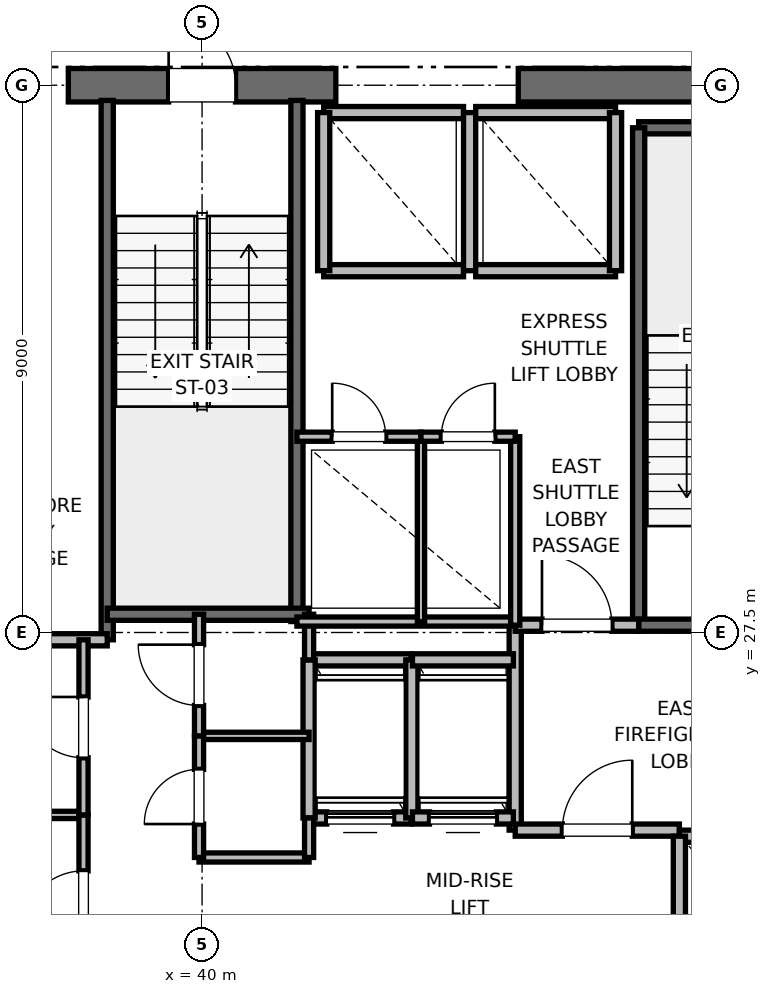
"""IFC4 building model, lengths in metres.
Left out: names, types, materials, properties, quantities, classifications, styles, units other than length and angle.
Written with IfcOpenShell. Run it as: python <this file> out.ifc"""

import sys

from ifc_helpers import new_model, si_unit, direction, frame, frame_2d, origin, place, context, subcontext, project, spatial, rectangle, extrude, element, fill, save


model = new_model("IFC4")
c1 = context("Model", 3, precision=1e-05, world=origin(), true_north=direction((0.0, 1.0)))
c2 = subcontext(c1, "Body", "Model", "MODEL_VIEW")
j1 = project(units=[si_unit("LENGTHUNIT", "METRE"), si_unit("PLANEANGLEUNIT", "RADIAN")], contexts=[c1])
p1 = place(None, origin())
s1 = spatial("IfcSite", under=j1, at=p1, CompositionType="ELEMENT")
p2 = place(p1, origin())
s2 = spatial("IfcBuilding", under=s1, at=p2, CompositionType="ELEMENT")
p3 = place(p2, frame((0.0, 0.0, 148.4)))
s3 = spatial("IfcBuildingStorey", under=s2, at=p3, CompositionType="ELEMENT", Elevation=148.4)
p4 = place(p3, frame((37.8, 36.5, 0.0), z_axis=(0.0, 0.0, 1.0), x_axis=(1.0, 0.0, 0.0)))
e1 = element("IfcWall", 1, at=p4, inside=s3, PredefinedType="SHEAR", context=c2, shape_type="SweptSolid", body=[
    extrude(rectangle(XDim=4.4, YDim=0.55, at=frame_2d((2.2, 0.0))), origin(), (0.0, 0.0, 1.0), 3.775),
])
p5 = place(p4, frame((1.65, 0.0, 0.0)))
e2 = element("IfcOpeningElement", 2, at=p5, cuts=e1, PredefinedType="OPENING", context=c2, shape_type="SweptSolid", body=[
    extrude(rectangle(XDim=1.1, YDim=2.15, at=frame_2d((0.55, 1.075))), frame((0.0, 0.275, 0.0), z_axis=(0.0, -1.0, 0.0), x_axis=(1.0, 0.0, 0.0)), (0.0, 0.0, 1.0), 0.55),
])
p6 = place(p3, frame((45.2, 36.5, 0.0), z_axis=(0.0, 0.0, 1.0), x_axis=(1.0, 0.0, 0.0)))
e3 = element("IfcWall", 3, at=p6, inside=s3, PredefinedType="SHEAR", context=c2, shape_type="SweptSolid", body=[
    extrude(rectangle(XDim=5.8, YDim=0.55, at=frame_2d((2.9, 0.0))), origin(), (0.0, 0.0, 1.0), 3.775),
])
p7 = place(p3, frame((47.18, 35.8, 0.0), z_axis=(0.0, 0.0, 1.0), x_axis=(1.0, 0.0, 0.0)))
e4 = element("IfcWall", 4, at=p7, inside=s3, PredefinedType="SOLIDWALL", context=c2, shape_type="SweptSolid", body=[
    extrude(rectangle(XDim=3.12, YDim=0.2, at=frame_2d((1.56, 0.0))), origin(), (0.0, 0.0, 1.0), 3.775),
])
p8 = place(p3, frame((47.18, 27.62, 0.0), z_axis=(0.0, 0.0, 1.0), x_axis=(0.0, 1.0, 0.0)))
e5 = element("IfcWall", 5, at=p8, inside=s3, PredefinedType="SOLIDWALL", context=c2, shape_type="SweptSolid", body=[
    extrude(rectangle(XDim=8.18, YDim=0.2, at=frame_2d((4.09, 0.0))), origin(), (0.0, 0.0, 1.0), 3.775),
])
p9 = place(p3, frame((47.18, 27.62, 0.0), z_axis=(0.0, 0.0, 1.0), x_axis=(1.0, 0.0, 0.0)))
e6 = element("IfcWall", 6, at=p9, inside=s3, PredefinedType="SOLIDWALL", context=c2, shape_type="SweptSolid", body=[
    extrude(rectangle(XDim=3.12, YDim=0.2, at=frame_2d((1.56, 0.0))), origin(), (0.0, 0.0, 1.0), 3.775),
])
p10 = place(p9, frame((1.01, 0.0, 0.0)))
e7 = element("IfcOpeningElement", 7, at=p10, cuts=e6, PredefinedType="OPENING", context=c2, shape_type="SweptSolid", body=[
    extrude(rectangle(XDim=1.1, YDim=2.15, at=frame_2d((0.55, 1.075))), frame((0.0, 0.1, 0.0), z_axis=(0.0, -1.0, 0.0), x_axis=(1.0, 0.0, 0.0)), (0.0, 0.0, 1.0), 0.2),
])
p11 = place(p3, frame((38.44, 27.38, 0.0), z_axis=(0.0, 0.0, 1.0), x_axis=(0.0, 1.0, 0.0)))
e8 = element("IfcWall", 8, at=p11, inside=s3, PredefinedType="SOLIDWALL", context=c2, shape_type="SweptSolid", body=[
    extrude(rectangle(XDim=8.87, YDim=0.2, at=frame_2d((4.435, 0.0))), origin(), (0.0, 0.0, 1.0), 3.775),
])
p12 = place(p3, frame((41.56, 27.68, 0.0), z_axis=(0.0, 0.0, 1.0), x_axis=(0.0, 1.0, 0.0)))
e9 = element("IfcWall", 9, at=p12, inside=s3, PredefinedType="SOLIDWALL", context=c2, shape_type="SweptSolid", body=[
    extrude(rectangle(XDim=8.57, YDim=0.2, at=frame_2d((4.285, 0.0))), origin(), (0.0, 0.0, 1.0), 3.775),
])
p13 = place(p3, frame((38.44, 27.8, 0.0), z_axis=(0.0, 0.0, 1.0), x_axis=(1.0, 0.0, 0.0)))
e10 = element("IfcWall", 10, at=p13, inside=s3, PredefinedType="SOLIDWALL", context=c2, shape_type="SweptSolid", body=[
    extrude(rectangle(XDim=3.32, YDim=0.2, at=frame_2d((1.66, 0.0))), origin(), (0.0, 0.0, 1.0), 3.775),
])
p14 = place(p3, frame((32.82, 27.38, 0.0), z_axis=(0.0, 0.0, 1.0), x_axis=(1.0, 0.0, 0.0)))
e11 = element("IfcWall", 11, at=p14, inside=s3, PredefinedType="PARTITIONING", context=c2, shape_type="SweptSolid", body=[
    extrude(rectangle(XDim=5.62, YDim=0.2, at=frame_2d((2.81, 0.0))), origin(), (0.0, 0.0, 1.0), 3.775),
])
p15 = place(p3, frame((45.15, 24.25, 0.0), z_axis=(0.0, 0.0, 1.0), x_axis=(0.0, 1.0, 0.0)))
e12 = element("IfcWall", 12, at=p15, inside=s3, PredefinedType="PARTITIONING", context=c2, shape_type="SweptSolid", body=[
    extrude(rectangle(XDim=3.37, YDim=0.2, at=frame_2d((1.685, 0.0))), origin(), (0.0, 0.0, 1.0), 3.775),
])
p16 = place(p3, frame((45.15, 24.25, 0.0), z_axis=(0.0, 0.0, 1.0), x_axis=(1.0, 0.0, 0.0)))
e13 = element("IfcWall", 13, at=p16, inside=s3, PredefinedType="PARTITIONING", context=c2, shape_type="SweptSolid", body=[
    extrude(rectangle(XDim=2.7, YDim=0.2, at=frame_2d((1.35, 0.0))), origin(), (0.0, 0.0, 1.0), 3.775),
])
p17 = place(p16, frame((0.775, 0.0, 0.0)))
e14 = element("IfcOpeningElement", 14, at=p17, cuts=e13, PredefinedType="OPENING", context=c2, shape_type="SweptSolid", body=[
    extrude(rectangle(XDim=1.15, YDim=2.2, at=frame_2d((0.575, 1.1))), frame((0.0, 0.1, 0.0), z_axis=(0.0, -1.0, 0.0), x_axis=(1.0, 0.0, 0.0)), (0.0, 0.0, 1.0), 0.2),
])
p18 = place(p3, frame((45.15, 27.62, 0.0), z_axis=(0.0, 0.0, 1.0), x_axis=(1.0, 0.0, 0.0)))
e15 = element("IfcWall", 15, at=p18, inside=s3, PredefinedType="PARTITIONING", context=c2, shape_type="SweptSolid", body=[
    extrude(rectangle(XDim=2.03, YDim=0.2, at=frame_2d((1.015, 0.0))), origin(), (0.0, 0.0, 1.0), 3.775),
])
p19 = place(p18, frame((0.44, 0.0, 0.0)))
e16 = element("IfcOpeningElement", 16, at=p19, cuts=e15, PredefinedType="OPENING", context=c2, shape_type="SweptSolid", body=[
    extrude(rectangle(XDim=1.15, YDim=2.2, at=frame_2d((0.575, 1.1))), frame((0.0, 0.1, 0.0), z_axis=(0.0, -1.0, 0.0), x_axis=(1.0, 0.0, 0.0)), (0.0, 0.0, 1.0), 0.2),
])
p20 = place(p3, frame((50.45, 24.15, 0.0), z_axis=(0.0, 0.0, 1.0), x_axis=(-1.0, 0.0, 0.0)))
e17 = element("IfcWall", 17, at=p20, inside=s3, PredefinedType="SOLIDWALL", context=c2, shape_type="SweptSolid", body=[
    extrude(rectangle(XDim=2.6, YDim=0.2, at=frame_2d((1.3, 0.0))), origin(), (0.0, 0.0, 1.0), 2.755),
])
p21 = place(p20, frame((0.75, 0.0, 0.0)))
e18 = element("IfcOpeningElement", 18, at=p21, cuts=e17, PredefinedType="OPENING", context=c2, shape_type="SweptSolid", body=[
    extrude(rectangle(XDim=1.1, YDim=2.2, at=frame_2d((0.55, 1.1))), frame((0.0, 0.1, 0.0), z_axis=(0.0, -1.0, 0.0), x_axis=(1.0, 0.0, 0.0)), (0.0, 0.0, 1.0), 0.2),
])
p22 = place(p3, frame((47.85, 24.15, 0.0), z_axis=(0.0, 0.0, 1.0), x_axis=(0.0, -1.0, 0.0)))
e19 = element("IfcWall", 19, at=p22, inside=s3, PredefinedType="SOLIDWALL", context=c2, shape_type="SweptSolid", body=[
    extrude(rectangle(XDim=3.0, YDim=0.2, at=frame_2d((1.5, 0.0))), origin(), (0.0, 0.0, 1.0), 3.775),
])
p23 = place(p3, frame((41.76, 24.45, 0.0), z_axis=(0.0, 0.0, 1.0), x_axis=(1.0, 0.0, 0.0)))
e20 = element("IfcWall", 20, at=p23, inside=s3, PredefinedType="SOLIDWALL", context=c2, shape_type="SweptSolid", body=[
    extrude(rectangle(XDim=1.68, YDim=0.2, at=frame_2d((0.84, 0.0))), origin(), (0.0, 0.0, 1.0), 3.775),
])
p24 = place(p23, frame((0.29, 0.0, 0.0)))
e21 = element("IfcOpeningElement", 21, at=p24, cuts=e20, PredefinedType="OPENING", context=c2, shape_type="SweptSolid", body=[
    extrude(rectangle(XDim=1.1, YDim=2.2, at=frame_2d((0.55, 1.1))), frame((0.0, 0.1, 0.0), z_axis=(0.0, -1.0, 0.0), x_axis=(1.0, 0.0, 0.0)), (0.0, 0.0, 1.0), 0.2),
])
p25 = place(p3, frame((43.44, 27.05, 0.0), z_axis=(0.0, 0.0, 1.0), x_axis=(-1.0, 0.0, 0.0)))
e22 = element("IfcWall", 22, at=p25, inside=s3, PredefinedType="SOLIDWALL", context=c2, shape_type="SweptSolid", body=[
    extrude(rectangle(XDim=1.68, YDim=0.2, at=frame_2d((0.84, 0.0))), origin(), (0.0, 0.0, 1.0), 3.775),
])
for number, where, z_axis, x_axis in (
    (23, (41.76, 27.05, 0.0), (0.0, 0.0, 1.0), (0.0, -1.0, 0.0)),
    (24, (43.45, 24.45, 0.0), (0.0, 0.0, 1.0), (0.0, 1.0, 0.0)),
):
    element("IfcWall", number, at=place(p3, frame(where, z_axis=z_axis, x_axis=x_axis)), inside=s3, PredefinedType="SOLIDWALL", context=c2, shape_type="SweptSolid", body=[
        extrude(rectangle(XDim=2.6, YDim=0.2, at=frame_2d((1.3, 0.0))), origin(), (0.0, 0.0, 1.0), 3.775),
    ])
p26 = place(p3, frame((43.46, 24.45, 0.0), z_axis=(0.0, 0.0, 1.0), x_axis=(1.0, 0.0, 0.0)))
e25 = element("IfcWall", 25, at=p26, inside=s3, PredefinedType="SOLIDWALL", context=c2, shape_type="SweptSolid", body=[
    extrude(rectangle(XDim=1.66, YDim=0.2, at=frame_2d((0.83, 0.0))), origin(), (0.0, 0.0, 1.0), 3.775),
])
p27 = place(p26, frame((0.28, 0.0, 0.0)))
e26 = element("IfcOpeningElement", 26, at=p27, cuts=e25, PredefinedType="OPENING", context=c2, shape_type="SweptSolid", body=[
    extrude(rectangle(XDim=1.1, YDim=2.2, at=frame_2d((0.55, 1.1))), frame((0.0, 0.1, 0.0), z_axis=(0.0, -1.0, 0.0), x_axis=(1.0, 0.0, 0.0)), (0.0, 0.0, 1.0), 0.2),
])
p28 = place(p3, frame((45.12, 27.05, 0.0), z_axis=(0.0, 0.0, 1.0), x_axis=(-1.0, 0.0, 0.0)))
e27 = element("IfcWall", 27, at=p28, inside=s3, PredefinedType="SOLIDWALL", context=c2, shape_type="SweptSolid", body=[
    extrude(rectangle(XDim=1.66, YDim=0.2, at=frame_2d((0.83, 0.0))), origin(), (0.0, 0.0, 1.0), 3.775),
])
p29 = place(p3, frame((42.0, 33.45, 0.0), z_axis=(0.0, 0.0, 1.0), x_axis=(1.0, 0.0, 0.0)))
e28 = element("IfcWall", 28, at=p29, inside=s3, PredefinedType="SOLIDWALL", context=c2, shape_type="SweptSolid", body=[
    extrude(rectangle(XDim=2.3, YDim=0.2, at=frame_2d((1.15, 0.0))), origin(), (0.0, 0.0, 1.0), 3.775),
])
p30 = place(p3, frame((44.3, 36.05, 0.0), z_axis=(0.0, 0.0, 1.0), x_axis=(-1.0, 0.0, 0.0)))
e29 = element("IfcWall", 29, at=p30, inside=s3, PredefinedType="SOLIDWALL", context=c2, shape_type="SweptSolid", body=[
    extrude(rectangle(XDim=2.3, YDim=0.2, at=frame_2d((1.15, 0.0))), origin(), (0.0, 0.0, 1.0), 2.755),
])
for number, where, z_axis, x_axis in (
    (30, (42.0, 36.05, 0.0), (0.0, 0.0, 1.0), (0.0, -1.0, 0.0)),
    (31, (44.4, 33.45, 0.0), (0.0, 0.0, 1.0), (0.0, 1.0, 0.0)),
):
    element("IfcWall", number, at=place(p3, frame(where, z_axis=z_axis, x_axis=x_axis)), inside=s3, PredefinedType="SOLIDWALL", context=c2, shape_type="SweptSolid", body=[
        extrude(rectangle(XDim=2.6, YDim=0.2, at=frame_2d((1.3, 0.0))), origin(), (0.0, 0.0, 1.0), 2.755),
    ])
p31 = place(p3, frame((44.5, 33.45, 0.0), z_axis=(0.0, 0.0, 1.0), x_axis=(1.0, 0.0, 0.0)))
e32 = element("IfcWall", 32, at=p31, inside=s3, PredefinedType="SOLIDWALL", context=c2, shape_type="SweptSolid", body=[
    extrude(rectangle(XDim=2.3, YDim=0.2, at=frame_2d((1.15, 0.0))), origin(), (0.0, 0.0, 1.0), 3.775),
])
p32 = place(p3, frame((46.8, 36.05, 0.0), z_axis=(0.0, 0.0, 1.0), x_axis=(-1.0, 0.0, 0.0)))
e33 = element("IfcWall", 33, at=p32, inside=s3, PredefinedType="SOLIDWALL", context=c2, shape_type="SweptSolid", body=[
    extrude(rectangle(XDim=2.3, YDim=0.2, at=frame_2d((1.15, 0.0))), origin(), (0.0, 0.0, 1.0), 2.755),
])
p33 = place(p3, frame((46.8, 33.45, 0.0), z_axis=(0.0, 0.0, 1.0), x_axis=(0.0, 1.0, 0.0)))
e34 = element("IfcWall", 34, at=p33, inside=s3, PredefinedType="SOLIDWALL", context=c2, shape_type="SweptSolid", body=[
    extrude(rectangle(XDim=2.6, YDim=0.2, at=frame_2d((1.3, 0.0))), origin(), (0.0, 0.0, 1.0), 3.775),
])
p34 = place(p3, frame((39.95, 23.8, 0.0), z_axis=(0.0, 0.0, 1.0), x_axis=(1.0, 0.0, 0.0)))
e35 = element("IfcWall", 35, at=p34, inside=s3, PredefinedType="PARTITIONING", context=c2, shape_type="SweptSolid", body=[
    extrude(rectangle(XDim=1.81, YDim=0.15, at=frame_2d((0.905, 0.0))), origin(), (0.0, 0.0, 1.0), 2.85),
])
p35 = place(p3, frame((39.95, 25.8, 0.0), z_axis=(0.0, 0.0, 1.0), x_axis=(1.0, 0.0, 0.0)))
e36 = element("IfcWall", 36, at=p35, inside=s3, PredefinedType="PARTITIONING", context=c2, shape_type="SweptSolid", body=[
    extrude(rectangle(XDim=1.81, YDim=0.12, at=frame_2d((0.905, 0.0))), origin(), (0.0, 0.0, 1.0), 2.85),
])
p36 = place(p3, frame((41.76, 23.8, 0.0), z_axis=(0.0, 0.0, 1.0), x_axis=(0.0, 1.0, 0.0)))
e37 = element("IfcWall", 37, at=p36, inside=s3, PredefinedType="PARTITIONING", context=c2, shape_type="SweptSolid", body=[
    extrude(rectangle(XDim=0.65, YDim=0.15, at=frame_2d((0.325, 0.0))), origin(), (0.0, 0.0, 1.0), 2.85),
])
p37 = place(p3, frame((41.76, 27.05, 0.0), z_axis=(0.0, 0.0, 1.0), x_axis=(0.0, 1.0, 0.0)))
e38 = element("IfcWall", 38, at=p37, inside=s3, PredefinedType="PARTITIONING", context=c2, shape_type="SweptSolid", body=[
    extrude(rectangle(XDim=0.75, YDim=0.15, at=frame_2d((0.375, 0.0))), origin(), (0.0, 0.0, 1.0), 2.85),
])
p38 = place(p3, frame((39.95, 23.8, 0.0), z_axis=(0.0, 0.0, 1.0), x_axis=(0.0, 1.0, 0.0)))
e39 = element("IfcWall", 39, at=p38, inside=s3, PredefinedType="PARTITIONING", context=c2, shape_type="SweptSolid", body=[
    extrude(rectangle(XDim=2.0, YDim=0.15, at=frame_2d((1.0, 0.0))), origin(), (0.0, 0.0, 1.0), 2.85),
])
p39 = place(p38, frame((0.55, 0.0, 0.0)))
e40 = element("IfcOpeningElement", 40, at=p39, cuts=e39, PredefinedType="OPENING", context=c2, shape_type="SweptSolid", body=[
    extrude(rectangle(XDim=0.9, YDim=2.1, at=frame_2d((0.45, 1.05))), frame((0.0, 0.075, 0.0), z_axis=(0.0, -1.0, 0.0), x_axis=(1.0, 0.0, 0.0)), (0.0, 0.0, 1.0), 0.15),
])
p40 = place(p3, frame((39.95, 25.8, 0.0), z_axis=(0.0, 0.0, 1.0), x_axis=(0.0, 1.0, 0.0)))
e41 = element("IfcWall", 41, at=p40, inside=s3, PredefinedType="PARTITIONING", context=c2, shape_type="SweptSolid", body=[
    extrude(rectangle(XDim=2.0, YDim=0.15, at=frame_2d((1.0, 0.0))), origin(), (0.0, 0.0, 1.0), 2.85),
])
p41 = place(p40, frame((0.5, 0.0, 0.0)))
e42 = element("IfcOpeningElement", 42, at=p41, cuts=e41, PredefinedType="OPENING", context=c2, shape_type="SweptSolid", body=[
    extrude(rectangle(XDim=1.0, YDim=2.15, at=frame_2d((0.5, 1.075))), frame((0.0, 0.075, 0.0), z_axis=(0.0, -1.0, 0.0), x_axis=(1.0, 0.0, 0.0)), (0.0, 0.0, 1.0), 0.15),
])
p42 = place(p3, frame((32.82, 24.5, 0.0), z_axis=(0.0, 0.0, 1.0), x_axis=(1.0, 0.0, 0.0)))
e43 = element("IfcWall", 43, at=p42, inside=s3, PredefinedType="PARTITIONING", context=c2, shape_type="SweptSolid", body=[
    extrude(rectangle(XDim=5.23, YDim=0.12, at=frame_2d((2.615, 0.0))), origin(), (0.0, 0.0, 1.0), 2.85),
])
p43 = place(p3, frame((38.05, 21.66, 0.0), z_axis=(0.0, 0.0, 1.0), x_axis=(0.0, 1.0, 0.0)))
e44 = element("IfcWall", 44, at=p43, inside=s3, PredefinedType="PARTITIONING", context=c2, shape_type="SweptSolid", body=[
    extrude(rectangle(XDim=2.84, YDim=0.15, at=frame_2d((1.42, 0.0))), origin(), (0.0, 0.0, 1.0), 2.85),
])
p44 = place(p43, frame((0.92, 0.0, 0.0)))
e45 = element("IfcOpeningElement", 45, at=p44, cuts=e44, PredefinedType="OPENING", context=c2, shape_type="SweptSolid", body=[
    extrude(rectangle(XDim=1.0, YDim=2.15, at=frame_2d((0.5, 1.075))), frame((0.0, 0.075, 0.0), z_axis=(0.0, -1.0, 0.0), x_axis=(1.0, 0.0, 0.0)), (0.0, 0.0, 1.0), 0.15),
])
p45 = place(p3, frame((38.05, 24.5, 0.0), z_axis=(0.0, 0.0, 1.0), x_axis=(0.0, 1.0, 0.0)))
e46 = element("IfcWall", 46, at=p45, inside=s3, PredefinedType="PARTITIONING", context=c2, shape_type="SweptSolid", body=[
    extrude(rectangle(XDim=2.88, YDim=0.15, at=frame_2d((1.44, 0.0))), origin(), (0.0, 0.0, 1.0), 2.85),
])
p46 = place(p45, frame((0.94, 0.0, 0.0)))
e47 = element("IfcOpeningElement", 47, at=p46, cuts=e46, PredefinedType="OPENING", context=c2, shape_type="SweptSolid", body=[
    extrude(rectangle(XDim=1.0, YDim=2.15, at=frame_2d((0.5, 1.075))), frame((0.0, 0.075, 0.0), z_axis=(0.0, -1.0, 0.0), x_axis=(1.0, 0.0, 0.0)), (0.0, 0.0, 1.0), 0.15),
])
p47 = place(p3, frame((41.56, 27.68, 0.0), z_axis=(0.0, 0.0, 1.0), x_axis=(1.0, 0.0, 0.0)))
e48 = element("IfcWall", 48, at=p47, inside=s3, PredefinedType="PARTITIONING", context=c2, shape_type="SweptSolid", body=[
    extrude(rectangle(XDim=3.59, YDim=0.15, at=frame_2d((1.795, 0.0))), origin(), (0.0, 0.0, 1.0), 2.85),
])
p48 = place(p3, frame((45.15, 27.62, 0.0), z_axis=(0.0, 0.0, 1.0), x_axis=(0.0, 1.0, 0.0)))
e49 = element("IfcWall", 49, at=p48, inside=s3, PredefinedType="PARTITIONING", context=c2, shape_type="SweptSolid", body=[
    extrude(rectangle(XDim=3.1, YDim=0.15, at=frame_2d((1.55, 0.0))), origin(), (0.0, 0.0, 1.0), 2.85),
])
p49 = place(p3, frame((43.6, 27.68, 0.0), z_axis=(0.0, 0.0, 1.0), x_axis=(0.0, 1.0, 0.0)))
e50 = element("IfcWall", 50, at=p49, inside=s3, PredefinedType="PARTITIONING", context=c2, shape_type="SweptSolid", body=[
    extrude(rectangle(XDim=3.04, YDim=0.12, at=frame_2d((1.52, 0.0))), origin(), (0.0, 0.0, 1.0), 2.85),
])
p50 = place(p3, frame((41.56, 30.72, 0.0), z_axis=(0.0, 0.0, 1.0), x_axis=(1.0, 0.0, 0.0)))
e51 = element("IfcWall", 51, at=p50, inside=s3, PredefinedType="PARTITIONING", context=c2, shape_type="SweptSolid", body=[
    extrude(rectangle(XDim=2.04, YDim=0.15, at=frame_2d((1.02, 0.0))), origin(), (0.0, 0.0, 1.0), 2.85),
])
p51 = place(p50, frame((0.58, 0.0, 0.0)))
e52 = element("IfcOpeningElement", 52, at=p51, cuts=e51, PredefinedType="OPENING", context=c2, shape_type="SweptSolid", body=[
    extrude(rectangle(XDim=0.88, YDim=2.1, at=frame_2d((0.44, 1.05))), frame((0.0, 0.075, 0.0), z_axis=(0.0, -1.0, 0.0), x_axis=(1.0, 0.0, 0.0)), (0.0, 0.0, 1.0), 0.15),
])
p52 = place(p3, frame((43.6, 30.72, 0.0), z_axis=(0.0, 0.0, 1.0), x_axis=(1.0, 0.0, 0.0)))
e53 = element("IfcWall", 53, at=p52, inside=s3, PredefinedType="PARTITIONING", context=c2, shape_type="SweptSolid", body=[
    extrude(rectangle(XDim=1.55, YDim=0.15, at=frame_2d((0.775, 0.0))), origin(), (0.0, 0.0, 1.0), 2.85),
])
p53 = place(p52, frame((0.335, 0.0, 0.0)))
e54 = element("IfcOpeningElement", 54, at=p53, cuts=e53, PredefinedType="OPENING", context=c2, shape_type="SweptSolid", body=[
    extrude(rectangle(XDim=0.88, YDim=2.1, at=frame_2d((0.44, 1.05))), frame((0.0, 0.075, 0.0), z_axis=(0.0, -1.0, 0.0), x_axis=(1.0, 0.0, 0.0)), (0.0, 0.0, 1.0), 0.15),
])
p54 = place(p5, origin())
e55 = element("IfcDoor", 55, at=p54, inside=s3, OperationType="SINGLE_SWING_LEFT", PredefinedType="DOOR", context=c2, shape_type="SweptSolid", body=[
    extrude(rectangle(XDim=1.1, YDim=2.15, at=frame_2d((0.55, 1.075))), frame((0.0, 0.025, 0.0), z_axis=(0.0, -1.0, 0.0), x_axis=(1.0, 0.0, 0.0)), (0.0, 0.0, 1.0), 0.05),
])
fill(e2, e55)
p55 = place(p17, origin())
e56 = element("IfcDoor", 56, at=p55, inside=s3, OperationType="SINGLE_SWING_RIGHT", PredefinedType="DOOR", context=c2, shape_type="SweptSolid", body=[
    extrude(rectangle(XDim=1.15, YDim=2.2, at=frame_2d((0.575, 1.1))), frame((0.0, 0.025, 0.0), z_axis=(0.0, -1.0, 0.0), x_axis=(1.0, 0.0, 0.0)), (0.0, 0.0, 1.0), 0.05),
])
fill(e14, e56)
p56 = place(p19, origin())
e57 = element("IfcDoor", 57, at=p56, inside=s3, OperationType="SINGLE_SWING_LEFT", PredefinedType="DOOR", context=c2, shape_type="SweptSolid", body=[
    extrude(rectangle(XDim=1.15, YDim=2.2, at=frame_2d((0.575, 1.1))), frame((0.0, 0.025, 0.0), z_axis=(0.0, -1.0, 0.0), x_axis=(1.0, 0.0, 0.0)), (0.0, 0.0, 1.0), 0.05),
])
fill(e16, e57)
p57 = place(p24, origin())
e58 = element("IfcDoor", 58, at=p57, inside=s3, OperationType="SLIDING_TO_RIGHT", PredefinedType="DOOR", context=c2, shape_type="SweptSolid", body=[
    extrude(rectangle(XDim=1.1, YDim=2.2, at=frame_2d((0.55, 1.1))), frame((0.0, 0.025, 0.0), z_axis=(0.0, -1.0, 0.0), x_axis=(1.0, 0.0, 0.0)), (0.0, 0.0, 1.0), 0.05),
])
fill(e21, e58)
p58 = place(p27, origin())
e59 = element("IfcDoor", 59, at=p58, inside=s3, OperationType="SLIDING_TO_RIGHT", PredefinedType="DOOR", context=c2, shape_type="SweptSolid", body=[
    extrude(rectangle(XDim=1.1, YDim=2.2, at=frame_2d((0.55, 1.1))), frame((0.0, 0.025, 0.0), z_axis=(0.0, -1.0, 0.0), x_axis=(1.0, 0.0, 0.0)), (0.0, 0.0, 1.0), 0.05),
])
fill(e26, e59)
p59 = place(p39, origin())
e60 = element("IfcDoor", 60, at=p59, inside=s3, OperationType="SINGLE_SWING_LEFT", PredefinedType="DOOR", context=c2, shape_type="SweptSolid", body=[
    extrude(rectangle(XDim=0.9, YDim=2.1, at=frame_2d((0.45, 1.05))), frame((0.0, 0.025, 0.0), z_axis=(0.0, -1.0, 0.0), x_axis=(1.0, 0.0, 0.0)), (0.0, 0.0, 1.0), 0.05),
])
fill(e40, e60)
p60 = place(p41, origin())
e61 = element("IfcDoor", 61, at=p60, inside=s3, OperationType="SINGLE_SWING_RIGHT", PredefinedType="DOOR", context=c2, shape_type="SweptSolid", body=[
    extrude(rectangle(XDim=1.0, YDim=2.15, at=frame_2d((0.5, 1.075))), frame((0.0, 0.025, 0.0), z_axis=(0.0, -1.0, 0.0), x_axis=(1.0, 0.0, 0.0)), (0.0, 0.0, 1.0), 0.05),
])
fill(e42, e61)
p61 = place(p44, origin())
e62 = element("IfcDoor", 62, at=p61, inside=s3, OperationType="SINGLE_SWING_LEFT", PredefinedType="DOOR", context=c2, shape_type="SweptSolid", body=[
    extrude(rectangle(XDim=1.0, YDim=2.15, at=frame_2d((0.5, 1.075))), frame((0.0, 0.025, 0.0), z_axis=(0.0, -1.0, 0.0), x_axis=(1.0, 0.0, 0.0)), (0.0, 0.0, 1.0), 0.05),
])
fill(e45, e62)
p62 = place(p46, origin())
e63 = element("IfcDoor", 63, at=p62, inside=s3, OperationType="SINGLE_SWING_RIGHT", PredefinedType="DOOR", context=c2, shape_type="SweptSolid", body=[
    extrude(rectangle(XDim=1.0, YDim=2.15, at=frame_2d((0.5, 1.075))), frame((0.0, 0.025, 0.0), z_axis=(0.0, -1.0, 0.0), x_axis=(1.0, 0.0, 0.0)), (0.0, 0.0, 1.0), 0.05),
])
fill(e47, e63)
p63 = place(p51, origin())
e64 = element("IfcDoor", 64, at=p63, inside=s3, OperationType="SINGLE_SWING_LEFT", PredefinedType="DOOR", context=c2, shape_type="SweptSolid", body=[
    extrude(rectangle(XDim=0.88, YDim=2.1, at=frame_2d((0.44, 1.05))), frame((0.0, 0.025, 0.0), z_axis=(0.0, -1.0, 0.0), x_axis=(1.0, 0.0, 0.0)), (0.0, 0.0, 1.0), 0.05),
])
fill(e52, e64)
p64 = place(p53, origin())
e65 = element("IfcDoor", 65, at=p64, inside=s3, OperationType="SINGLE_SWING_RIGHT", PredefinedType="DOOR", context=c2, shape_type="SweptSolid", body=[
    extrude(rectangle(XDim=0.88, YDim=2.1, at=frame_2d((0.44, 1.05))), frame((0.0, 0.025, 0.0), z_axis=(0.0, -1.0, 0.0), x_axis=(1.0, 0.0, 0.0)), (0.0, 0.0, 1.0), 0.05),
])
fill(e54, e65)
save(model, sys.argv[1])
